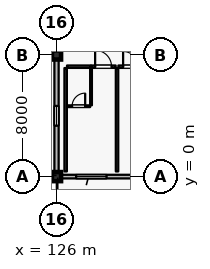
"""IFC4 building model, lengths in metres.
Left out: names, types, materials, properties, quantities, classifications, styles, units other than length and angle.
Written with IfcOpenShell. Run it as: python <this file> out.ifc"""

import sys

from ifc_helpers import new_model, si_unit, direction, frame, frame_2d, origin, origin_2d, place, context, subcontext, project, spatial, rectangle, extrude, element, fill, save


model = new_model("IFC4")
c1 = context("Model", 3, precision=1e-05, world=origin(), true_north=direction((0.0, 1.0)))
c2 = subcontext(c1, "Body", "Model", "MODEL_VIEW")
j1 = project(units=[si_unit("LENGTHUNIT", "METRE"), si_unit("PLANEANGLEUNIT", "RADIAN")], contexts=[c1])
p1 = place(None, origin())
s1 = spatial("IfcSite", under=j1, at=p1, CompositionType="ELEMENT")
p2 = place(p1, origin())
s2 = spatial("IfcBuilding", under=s1, at=p2, CompositionType="ELEMENT")
p3 = place(p2, frame((0.0, 0.0, 43.2)))
s3 = spatial("IfcBuildingStorey", under=s2, at=p3, CompositionType="ELEMENT", Elevation=43.2)
for number, where, z_axis, x_axis in (
    (1, (126.0, 0.0, 0.0), (0.0, 0.0, 1.0), (1.0, 0.0, 0.0)),
    (2, (126.0, 8.0, 0.0), (0.0, 0.0, 1.0), (1.0, 0.0, 0.0)),
):
    element("IfcColumn", number, at=place(p3, frame(where, z_axis=z_axis, x_axis=x_axis)), inside=s3, PredefinedType="COLUMN", context=c2, shape_type="SweptSolid", body=[
        extrude(rectangle(XDim=0.6, YDim=0.6, at=origin_2d()), origin(), (0.0, 0.0, 1.0), 4.2),
    ])
p4 = place(p3, frame((134.1, 0.0, 0.0), z_axis=(0.0, 0.0, 1.0), x_axis=(-1.0, 0.0, 0.0)))
e3 = element("IfcWall", 3, at=p4, inside=s3, PredefinedType="SOLIDWALL", context=c2, shape_type="SweptSolid", body=[
    extrude(rectangle(XDim=7.8, YDim=0.24, at=frame_2d((3.9, 0.0))), origin(), (0.0, 0.0, 1.0), 3.54),
])
p5 = place(p4, frame((1.675, 0.0, 0.0)))
e4 = element("IfcOpeningElement", 4, at=p5, cuts=e3, PredefinedType="OPENING", context=c2, shape_type="SweptSolid", body=[
    extrude(rectangle(XDim=1.5, YDim=2.25, at=frame_2d((0.75, 1.125))), frame((0.0, 0.13, 0.0), z_axis=(0.0, -1.0, 0.0), x_axis=(1.0, 0.0, 0.0)), (0.0, 0.0, 1.0), 0.26),
])
p6 = place(p4, frame((4.81, 0.0, 0.8)))
e5 = element("IfcOpeningElement", 5, at=p6, cuts=e3, PredefinedType="OPENING", context=c2, shape_type="SweptSolid", body=[
    extrude(rectangle(XDim=2.0, YDim=1.75, at=frame_2d((1.0, 0.875))), frame((0.0, 0.13, 0.0), z_axis=(0.0, -1.0, 0.0), x_axis=(1.0, 0.0, 0.0)), (0.0, 0.0, 1.0), 0.26),
])
p7 = place(p3, frame((126.0, 0.3, 0.0), z_axis=(0.0, 0.0, 1.0), x_axis=(0.0, 1.0, 0.0)))
e6 = element("IfcWall", 6, at=p7, inside=s3, PredefinedType="SOLIDWALL", context=c2, shape_type="SweptSolid", body=[
    extrude(rectangle(XDim=7.4, YDim=0.28, at=frame_2d((3.7, 0.0))), origin(), (0.0, 0.0, 1.0), 3.3),
])
p8 = place(p7, frame((3.05, 0.0, 0.75)))
e7 = element("IfcOpeningElement", 7, at=p8, cuts=e6, PredefinedType="OPENING", context=c2, shape_type="SweptSolid", body=[
    extrude(rectangle(XDim=1.3, YDim=1.65, at=frame_2d((0.65, 0.825))), frame((0.0, 0.15, 0.0), z_axis=(0.0, -1.0, 0.0), x_axis=(1.0, 0.0, 0.0)), (0.0, 0.0, 1.0), 0.3),
])
p9 = place(p3, frame((126.69, 7.23, 0.0), z_axis=(0.0, 0.0, 1.0), x_axis=(1.0, 0.0, 0.0)))
e8 = element("IfcWall", 8, at=p9, inside=s3, PredefinedType="PARTITIONING", context=c2, shape_type="SweptSolid", body=[
    extrude(rectangle(XDim=1.57, YDim=0.16, at=frame_2d((0.785, 0.0))), origin(), (0.0, 0.0, 1.0), 3.935),
])
p10 = place(p3, frame((128.27, 7.23, 0.0), z_axis=(0.0, 0.0, 1.0), x_axis=(1.0, 0.0, 0.0)))
e9 = element("IfcWall", 9, at=p10, inside=s3, PredefinedType="PARTITIONING", context=c2, shape_type="SweptSolid", body=[
    extrude(rectangle(XDim=1.62, YDim=0.16, at=frame_2d((0.81, 0.0))), origin(), (0.0, 0.0, 1.0), 3.935),
])
p11 = place(p10, frame((0.27, 0.0, 0.0)))
e10 = element("IfcOpeningElement", 10, at=p11, cuts=e9, PredefinedType="OPENING", context=c2, shape_type="SweptSolid", body=[
    extrude(rectangle(XDim=1.08, YDim=2.3, at=frame_2d((0.54, 1.15))), frame((0.0, 0.09, 0.0), z_axis=(0.0, -1.0, 0.0), x_axis=(1.0, 0.0, 0.0)), (0.0, 0.0, 1.0), 0.18),
])
p12 = place(p3, frame((128.27, 4.69, 0.0), z_axis=(0.0, 0.0, 1.0), x_axis=(0.0, 1.0, 0.0)))
e11 = element("IfcWall", 11, at=p12, inside=s3, PredefinedType="PARTITIONING", context=c2, shape_type="SweptSolid", body=[
    extrude(rectangle(XDim=2.45, YDim=0.115, at=frame_2d((1.225, 0.0))), origin(), (0.0, 0.0, 1.0), 3.935),
])
p13 = place(p3, frame((126.7, 4.63, 0.0), z_axis=(0.0, 0.0, 1.0), x_axis=(1.0, 0.0, 0.0)))
e12 = element("IfcWall", 12, at=p13, inside=s3, PredefinedType="PARTITIONING", context=c2, shape_type="SweptSolid", body=[
    extrude(rectangle(XDim=1.51, YDim=0.115, at=frame_2d((0.755, 0.0))), origin(), (0.0, 0.0, 1.0), 3.935),
])
p14 = place(p13, frame((0.325, 0.0, 0.0)))
e13 = element("IfcOpeningElement", 13, at=p14, cuts=e12, PredefinedType="OPENING", context=c2, shape_type="SweptSolid", body=[
    extrude(rectangle(XDim=0.86, YDim=2.12, at=frame_2d((0.43, 1.06))), frame((0.0, 0.067, 0.0), z_axis=(0.0, -1.0, 0.0), x_axis=(1.0, 0.0, 0.0)), (0.0, 0.0, 1.0), 0.135),
])
p15 = place(p3, frame((126.6, 0.34, 0.0), z_axis=(0.0, 0.0, 1.0), x_axis=(0.0, 1.0, 0.0)))
e14 = element("IfcWall", 14, at=p15, inside=s3, PredefinedType="PARTITIONING", context=c2, shape_type="SweptSolid", body=[
    extrude(rectangle(XDim=6.8, YDim=0.16, at=frame_2d((3.4, 0.0))), origin(), (0.0, 0.0, 1.0), 3.935),
])
p16 = place(p3, frame((130.07, 7.23, 0.0), z_axis=(0.0, 0.0, 1.0), x_axis=(1.0, 0.0, 0.0)))
e15 = element("IfcWall", 15, at=p16, inside=s3, PredefinedType="PARTITIONING", context=c2, shape_type="SweptSolid", body=[
    extrude(rectangle(XDim=1.62, YDim=0.16, at=frame_2d((0.81, 0.0))), origin(), (0.0, 0.0, 1.0), 3.935),
])
p17 = place(p16, frame((0.31, 0.0, 0.0)))
e16 = element("IfcOpeningElement", 16, at=p17, cuts=e15, PredefinedType="OPENING", context=c2, shape_type="SweptSolid", body=[
    extrude(rectangle(XDim=1.0, YDim=2.25, at=frame_2d((0.5, 1.125))), frame((0.0, 0.09, 0.0), z_axis=(0.0, -1.0, 0.0), x_axis=(1.0, 0.0, 0.0)), (0.0, 0.0, 1.0), 0.18),
])
p18 = place(p3, frame((129.98, 0.34, 0.0), z_axis=(0.0, 0.0, 1.0), x_axis=(0.0, 1.0, 0.0)))
e17 = element("IfcWall", 17, at=p18, inside=s3, PredefinedType="PARTITIONING", context=c2, shape_type="SweptSolid", body=[
    extrude(rectangle(XDim=6.8, YDim=0.16, at=frame_2d((3.4, 0.0))), origin(), (0.0, 0.0, 1.0), 3.935),
])
p19 = place(p6, origin())
e18 = element("IfcWindow", 18, at=p19, inside=s3, PartitioningType="DOUBLE_PANEL_VERTICAL", PredefinedType="WINDOW", context=c2, shape_type="SweptSolid", body=[
    extrude(rectangle(XDim=2.0, YDim=1.75, at=frame_2d((1.0, 0.875))), frame((0.0, 0.03, 0.0), z_axis=(0.0, -1.0, 0.0), x_axis=(1.0, 0.0, 0.0)), (0.0, 0.0, 1.0), 0.06),
])
fill(e5, e18)
p20 = place(p8, origin())
e19 = element("IfcWindow", 19, at=p20, inside=s3, PartitioningType="SINGLE_PANEL", PredefinedType="WINDOW", context=c2, shape_type="SweptSolid", body=[
    extrude(rectangle(XDim=1.3, YDim=1.65, at=frame_2d((0.65, 0.825))), frame((0.0, 0.03, 0.0), z_axis=(0.0, -1.0, 0.0), x_axis=(1.0, 0.0, 0.0)), (0.0, 0.0, 1.0), 0.06),
])
fill(e7, e19)
p21 = place(p11, origin())
e20 = element("IfcDoor", 20, at=p21, inside=s3, OperationType="SINGLE_SWING_LEFT", PredefinedType="DOOR", context=c2, shape_type="SweptSolid", body=[
    extrude(rectangle(XDim=1.08, YDim=2.3, at=frame_2d((0.54, 1.15))), frame((0.0, 0.025, 0.0), z_axis=(0.0, -1.0, 0.0), x_axis=(1.0, 0.0, 0.0)), (0.0, 0.0, 1.0), 0.05),
])
fill(e10, e20)
p22 = place(p14, origin())
e21 = element("IfcDoor", 21, at=p22, inside=s3, OperationType="SINGLE_SWING_RIGHT", PredefinedType="DOOR", context=c2, shape_type="SweptSolid", body=[
    extrude(rectangle(XDim=0.86, YDim=2.12, at=frame_2d((0.43, 1.06))), frame((0.0, 0.025, 0.0), z_axis=(0.0, -1.0, 0.0), x_axis=(1.0, 0.0, 0.0)), (0.0, 0.0, 1.0), 0.05),
])
fill(e13, e21)
p23 = place(p17, origin())
e22 = element("IfcDoor", 22, at=p23, inside=s3, OperationType="SINGLE_SWING_LEFT", PredefinedType="DOOR", context=c2, shape_type="SweptSolid", body=[
    extrude(rectangle(XDim=1.0, YDim=2.25, at=frame_2d((0.5, 1.125))), frame((0.0, 0.025, 0.0), z_axis=(0.0, -1.0, 0.0), x_axis=(1.0, 0.0, 0.0)), (0.0, 0.0, 1.0), 0.05),
])
fill(e16, e22)
save(model, sys.argv[1])
